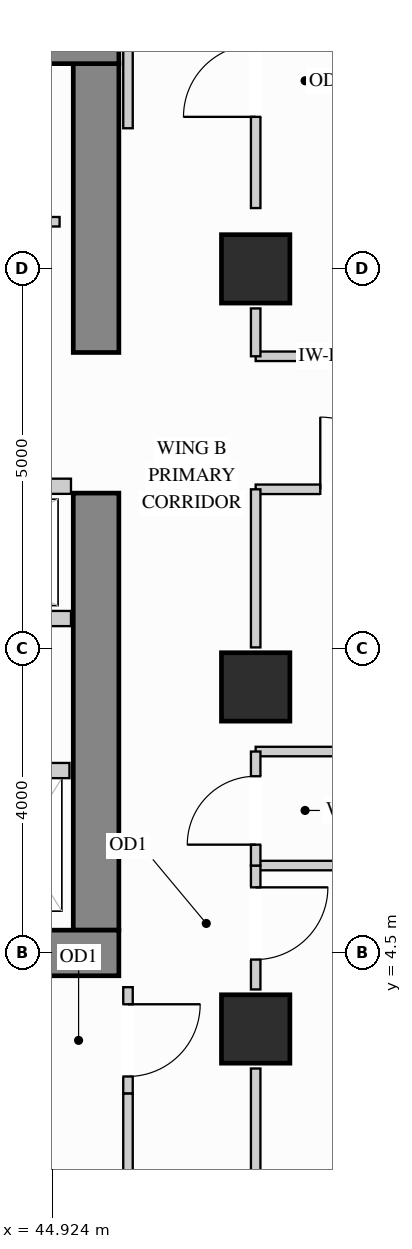
"""IFC4 building model, lengths in metres.
Left out: names, types, materials, properties, quantities, classifications, styles, units other than length and angle.
Written with IfcOpenShell. Run it as: python <this file> out.ifc"""

import sys

from ifc_helpers import new_model, si_unit, direction, frame, frame_2d, origin, origin_2d, place, context, subcontext, project, spatial, rectangle, extrude, source, transform, mapped, element, fill, save


model = new_model("IFC4")
c1 = context("Model", 3, precision=1e-05, world=origin(), true_north=direction((0.0, 1.0)))
c2 = subcontext(c1, "Body", "Model", "MODEL_VIEW")
j1 = project(units=[si_unit("LENGTHUNIT", "METRE"), si_unit("PLANEANGLEUNIT", "RADIAN")], contexts=[c1])
p1 = place(None, origin())
s1 = spatial("IfcSite", under=j1, at=p1, CompositionType="ELEMENT")
p2 = place(p1, origin())
s2 = spatial("IfcBuilding", under=s1, at=p2, CompositionType="ELEMENT")
p3 = place(p2, frame((0.0, 0.0, 171.9)))
s3 = spatial("IfcBuildingStorey", under=s2, at=p3, CompositionType="ELEMENT", Elevation=171.9)
m1 = source(origin(), c2, "Body", "SweptSolid", [
    extrude(rectangle(XDim=0.9, YDim=0.9, at=origin_2d()), origin(), (0.0, 0.0, 1.0), 3.4),
])
for number, where, z_axis, x_axis in (
    (1, (47.6, 13.5, 0.0), (0.0, 0.0, 1.0), (1.0, 0.0, 0.0)),
    (2, (47.6, 3.5, 0.0), (0.0, 0.0, 1.0), (1.0, 0.0, 0.0)),
    (3, (47.6, 8.0, 0.0), (0.0, 0.0, 1.0), (1.0, 0.0, 0.0)),
):
    element("IfcColumn", number, at=place(p3, frame(where, z_axis=z_axis, x_axis=x_axis)), inside=s3, PredefinedType="COLUMN", context=c2, shape_type="MappedRepresentation", body=[
        mapped(m1, transform((0.0, 0.0, 0.0), x_axis=(1.0, 0.0, 0.0), y_axis=(0.0, 1.0, 0.0), z_axis=(0.0, 0.0, 1.0))),
    ])
m2 = source(origin(), c2, "Body", "SweptSolid", [
    extrude(rectangle(XDim=5.75, YDim=0.6, at=frame_2d((2.875, 0.0))), origin(), (0.0, 0.0, 1.0), 3.4),
])
p4 = place(p3, frame((45.5, 4.8, 0.0), z_axis=(0.0, 0.0, 1.0), x_axis=(0.0, 1.0, 0.0)))
e4 = element("IfcWall", 4, at=p4, inside=s3, PredefinedType="SHEAR", context=c2, shape_type="MappedRepresentation", body=[
    mapped(m2, transform((0.0, 0.0, 0.0), x_axis=(1.0, 0.0, 0.0), y_axis=(0.0, 1.0, 0.0), z_axis=(0.0, 0.0, 1.0))),
])
m3 = source(origin(), c2, "Body", "SweptSolid", [
    extrude(rectangle(XDim=3.8, YDim=0.6, at=frame_2d((1.9, 0.0))), origin(), (0.0, 0.0, 1.0), 3.4),
])
p5 = place(p3, frame((45.5, 12.4, 0.0), z_axis=(0.0, 0.0, 1.0), x_axis=(0.0, 1.0, 0.0)))
e5 = element("IfcWall", 5, at=p5, inside=s3, PredefinedType="SHEAR", context=c2, shape_type="MappedRepresentation", body=[
    mapped(m3, transform((0.0, 0.0, 0.0), x_axis=(1.0, 0.0, 0.0), y_axis=(0.0, 1.0, 0.0), z_axis=(0.0, 0.0, 1.0))),
])
m4 = source(origin(), c2, "Body", "SweptSolid", [
    extrude(rectangle(XDim=10.1, YDim=0.6, at=frame_2d((5.05, 0.0))), origin(), (0.0, 0.0, 1.0), 3.4),
])
for number, where, z_axis, x_axis in (
    (6, (35.7, 16.5, 0.0), (0.0, 0.0, 1.0), (1.0, 0.0, 0.0)),
    (7, (35.7, 4.5, 0.0), (0.0, 0.0, 1.0), (1.0, 0.0, 0.0)),
):
    element("IfcWall", number, at=place(p3, frame(where, z_axis=z_axis, x_axis=x_axis)), inside=s3, PredefinedType="SHEAR", context=c2, shape_type="MappedRepresentation", body=[
        mapped(m4, transform((0.0, 0.0, 0.0), x_axis=(1.0, 0.0, 0.0), y_axis=(0.0, 1.0, 0.0), z_axis=(0.0, 0.0, 1.0))),
    ])
p6 = place(p3, frame((40.75, 14.12, 0.0), z_axis=(0.0, 0.0, 1.0), x_axis=(1.0, 0.0, 0.0)))
e8 = element("IfcWall", 8, at=p6, inside=s3, PredefinedType="PARTITIONING", context=c2, shape_type="SweptSolid", body=[
    extrude(rectangle(XDim=4.27, YDim=0.125, at=frame_2d((2.135, 0.0))), origin(), (0.0, 0.0, 1.0), 3.385),
])
p7 = place(p6, frame((1.66, 0.0, 0.0)))
e9 = element("IfcOpeningElement", 9, at=p7, cuts=e8, PredefinedType="OPENING", context=c2, shape_type="SweptSolid", body=[
    extrude(rectangle(XDim=0.95, YDim=2.15, at=frame_2d((0.475, 1.075))), frame((0.0, 0.073, 0.0), z_axis=(0.0, -1.0, 0.0), x_axis=(1.0, 0.0, 0.0)), (0.0, 0.0, 1.0), 0.145),
])
m5 = source(origin(), c2, "Body", "SweptSolid", [
    extrude(rectangle(XDim=5.048, YDim=0.125, at=frame_2d((2.524, 0.0))), origin(), (0.0, 0.0, 1.0), 3.385),
])
for number, where, z_axis, x_axis in (
    (10, (47.6, 5.65, 0.0), (0.0, 0.0, 1.0), (1.0, 0.0, 0.0)),
    (11, (47.6, 7.15, 0.0), (0.0, 0.0, 1.0), (1.0, 0.0, 0.0)),
):
    element("IfcWall", number, at=place(p3, frame(where, z_axis=z_axis, x_axis=x_axis)), inside=s3, PredefinedType="PARTITIONING", context=c2, shape_type="MappedRepresentation", body=[
        mapped(m5, transform((0.0, 0.0, 0.0), x_axis=(1.0, 0.0, 0.0), y_axis=(0.0, 1.0, 0.0), z_axis=(0.0, 0.0, 1.0))),
    ])
m6 = source(origin(), c2, "Body", "SweptSolid", [
    extrude(rectangle(XDim=2.65, YDim=0.125, at=frame_2d((1.325, 0.0))), origin(), (0.0, 0.0, 1.0), 3.385),
])
p8 = place(p3, frame((47.6, 12.35, 0.0), z_axis=(0.0, 0.0, 1.0), x_axis=(1.0, 0.0, 0.0)))
e12 = element("IfcWall", 12, at=p8, inside=s3, PredefinedType="PARTITIONING", context=c2, shape_type="MappedRepresentation", body=[
    mapped(m6, transform((0.0, 0.0, 0.0), x_axis=(1.0, 0.0, 0.0), y_axis=(0.0, 1.0, 0.0), z_axis=(0.0, 0.0, 1.0))),
])
p9 = place(p3, frame((47.6, 10.6, 0.0), z_axis=(0.0, 0.0, 1.0), x_axis=(1.0, 0.0, 0.0)))
e13 = element("IfcWall", 13, at=p9, inside=s3, PredefinedType="PARTITIONING", context=c2, shape_type="SweptSolid", body=[
    extrude(rectangle(XDim=2.65, YDim=0.125, at=frame_2d((1.325, 0.0))), origin(), (0.0, 0.0, 1.0), 2.773),
])
p10 = place(p9, frame((0.85, 0.0, 0.0)))
e14 = element("IfcOpeningElement", 14, at=p10, cuts=e13, PredefinedType="OPENING", context=c2, shape_type="SweptSolid", body=[
    extrude(rectangle(XDim=0.95, YDim=2.15, at=frame_2d((0.475, 1.075))), frame((0.0, 0.073, 0.0), z_axis=(0.0, -1.0, 0.0), x_axis=(1.0, 0.0, 0.0)), (0.0, 0.0, 1.0), 0.145),
])
p11 = place(p3, frame((47.6, 4.02, 0.0), z_axis=(0.0, 0.0, 1.0), x_axis=(0.0, 1.0, 0.0)))
e15 = element("IfcWall", 15, at=p11, inside=s3, PredefinedType="PARTITIONING", context=c2, shape_type="SweptSolid", body=[
    extrude(rectangle(XDim=1.63, YDim=0.125, at=frame_2d((0.815, 0.0))), origin(), (0.0, 0.0, 1.0), 2.773),
])
p12 = place(p11, frame((0.393, 0.0, 0.0)))
e16 = element("IfcOpeningElement", 16, at=p12, cuts=e15, PredefinedType="OPENING", context=c2, shape_type="SweptSolid", body=[
    extrude(rectangle(XDim=0.95, YDim=2.15, at=frame_2d((0.475, 1.075))), frame((0.0, 0.073, 0.0), z_axis=(0.0, -1.0, 0.0), x_axis=(1.0, 0.0, 0.0)), (0.0, 0.0, 1.0), 0.145),
])
m7 = source(origin(), c2, "Body", "SweptSolid", [
    extrude(rectangle(XDim=1.86, YDim=0.125, at=frame_2d((0.93, 0.0))), origin(), (0.0, 0.0, 1.0), 2.773),
])
p13 = place(p3, frame((47.6, 1.12, 0.0), z_axis=(0.0, 0.0, 1.0), x_axis=(0.0, 1.0, 0.0)))
e17 = element("IfcWall", 17, at=p13, inside=s3, PredefinedType="PARTITIONING", context=c2, shape_type="MappedRepresentation", body=[
    mapped(m7, transform((0.0, 0.0, 0.0), x_axis=(1.0, 0.0, 0.0), y_axis=(0.0, 1.0, 0.0), z_axis=(0.0, 0.0, 1.0))),
])
m8 = source(origin(), c2, "Body", "SweptSolid", [
    extrude(rectangle(XDim=2.08, YDim=0.125, at=frame_2d((1.04, 0.0))), origin(), (0.0, 0.0, 1.0), 2.773),
])
p14 = place(p3, frame((47.6, 8.52, 0.0), z_axis=(0.0, 0.0, 1.0), x_axis=(0.0, 1.0, 0.0)))
e18 = element("IfcWall", 18, at=p14, inside=s3, PredefinedType="PARTITIONING", context=c2, shape_type="MappedRepresentation", body=[
    mapped(m8, transform((0.0, 0.0, 0.0), x_axis=(1.0, 0.0, 0.0), y_axis=(0.0, 1.0, 0.0), z_axis=(0.0, 0.0, 1.0))),
])
p15 = place(p3, frame((47.6, 14.3, 0.0), z_axis=(0.0, 0.0, 1.0), x_axis=(0.0, 1.0, 0.0)))
e19 = element("IfcWall", 19, at=p15, inside=s3, PredefinedType="PARTITIONING", context=c2, shape_type="SweptSolid", body=[
    extrude(rectangle(XDim=2.58, YDim=0.125, at=frame_2d((1.29, 0.0))), origin(), (0.0, 0.0, 1.0), 2.773),
])
p16 = place(p15, frame((1.2, 0.0, 0.0)))
e20 = element("IfcOpeningElement", 20, at=p16, cuts=e19, PredefinedType="OPENING", context=c2, shape_type="SweptSolid", body=[
    extrude(rectangle(XDim=0.95, YDim=2.15, at=frame_2d((0.475, 1.075))), frame((0.0, 0.073, 0.0), z_axis=(0.0, -1.0, 0.0), x_axis=(1.0, 0.0, 0.0)), (0.0, 0.0, 1.0), 0.145),
])
m9 = source(origin(), c2, "Body", "SweptSolid", [
    extrude(rectangle(XDim=0.63, YDim=0.125, at=frame_2d((0.315, 0.0))), origin(), (0.0, 0.0, 1.0), 2.773),
])
p17 = place(p3, frame((47.6, 12.35, 0.0), z_axis=(0.0, 0.0, 1.0), x_axis=(0.0, 1.0, 0.0)))
e21 = element("IfcWall", 21, at=p17, inside=s3, PredefinedType="PARTITIONING", context=c2, shape_type="MappedRepresentation", body=[
    mapped(m9, transform((0.0, 0.0, 0.0), x_axis=(1.0, 0.0, 0.0), y_axis=(0.0, 1.0, 0.0), z_axis=(0.0, 0.0, 1.0))),
])
p18 = place(p3, frame((47.6, 5.65, 0.0), z_axis=(0.0, 0.0, 1.0), x_axis=(0.0, 1.0, 0.0)))
e22 = element("IfcWall", 22, at=p18, inside=s3, PredefinedType="PARTITIONING", context=c2, shape_type="SweptSolid", body=[
    extrude(rectangle(XDim=1.5, YDim=0.125, at=frame_2d((0.75, 0.0))), origin(), (0.0, 0.0, 1.0), 2.773),
])
p19 = place(p18, frame((0.275, 0.0, 0.0)))
e23 = element("IfcOpeningElement", 23, at=p19, cuts=e22, PredefinedType="OPENING", context=c2, shape_type="SweptSolid", body=[
    extrude(rectangle(XDim=0.9, YDim=2.15, at=frame_2d((0.45, 1.075))), frame((0.0, 0.073, 0.0), z_axis=(0.0, -1.0, 0.0), x_axis=(1.0, 0.0, 0.0)), (0.0, 0.0, 1.0), 0.145),
])
m10 = source(origin(), c2, "Body", "SweptSolid", [
    extrude(rectangle(XDim=2.298, YDim=0.125, at=frame_2d((1.149, 0.0))), origin(), (0.0, 0.0, 1.0), 3.385),
])
p20 = place(p3, frame((45.92, 15.35, 0.0), z_axis=(0.0, 0.0, 1.0), x_axis=(0.0, 1.0, 0.0)))
e24 = element("IfcWall", 24, at=p20, inside=s3, PredefinedType="PARTITIONING", context=c2, shape_type="MappedRepresentation", body=[
    mapped(m10, transform((0.0, 0.0, 0.0), x_axis=(1.0, 0.0, 0.0), y_axis=(0.0, 1.0, 0.0), z_axis=(0.0, 0.0, 1.0))),
])
p21 = place(p3, frame((45.92, 2.65, 0.0), z_axis=(0.0, 0.0, 1.0), x_axis=(0.0, 1.0, 0.0)))
e25 = element("IfcWall", 25, at=p21, inside=s3, PredefinedType="PARTITIONING", context=c2, shape_type="SweptSolid", body=[
    extrude(rectangle(XDim=1.4, YDim=0.125, at=frame_2d((0.7, 0.0))), origin(), (0.0, 0.0, 1.0), 3.385),
])
p22 = place(p21, frame((0.225, 0.0, 0.0)))
e26 = element("IfcOpeningElement", 26, at=p22, cuts=e25, PredefinedType="OPENING", context=c2, shape_type="SweptSolid", body=[
    extrude(rectangle(XDim=0.95, YDim=2.15, at=frame_2d((0.475, 1.075))), frame((0.0, 0.073, 0.0), z_axis=(0.0, -1.0, 0.0), x_axis=(1.0, 0.0, 0.0)), (0.0, 0.0, 1.0), 0.145),
])
p23 = place(p3, frame((45.92, 0.352, 0.0), z_axis=(0.0, 0.0, 1.0), x_axis=(0.0, 1.0, 0.0)))
e27 = element("IfcWall", 27, at=p23, inside=s3, PredefinedType="PARTITIONING", context=c2, shape_type="MappedRepresentation", body=[
    mapped(m10, transform((0.0, 0.0, 0.0), x_axis=(1.0, 0.0, 0.0), y_axis=(0.0, 1.0, 0.0), z_axis=(0.0, 0.0, 1.0))),
])
m11 = source(origin(), c2, "Body", "SweptSolid", [
    extrude(rectangle(XDim=1.3, YDim=0.2, at=frame_2d((0.65, 0.0))), origin(), (0.0, 0.0, 1.0), 3.385),
])
p24 = place(p3, frame((43.85, 6.9, 0.0), z_axis=(0.0, 0.0, 1.0), x_axis=(1.0, 0.0, 0.0)))
e28 = element("IfcWall", 28, at=p24, inside=s3, PredefinedType="PARTITIONING", context=c2, shape_type="MappedRepresentation", body=[
    mapped(m11, transform((0.0, 0.0, 0.0), x_axis=(1.0, 0.0, 0.0), y_axis=(0.0, 1.0, 0.0), z_axis=(0.0, 0.0, 1.0))),
])
m12 = source(origin(), c2, "Body", "SweptSolid", [
    extrude(rectangle(XDim=3.49, YDim=0.2, at=frame_2d((1.745, 0.0))), origin(), (0.0, 0.0, 1.0), 3.385),
])
for number, where, z_axis, x_axis in (
    (29, (41.68, 10.64, 0.0), (0.0, 0.0, 1.0), (1.0, 0.0, 0.0)),
    (30, (41.68, 8.9, 0.0), (0.0, 0.0, 1.0), (1.0, 0.0, 0.0)),
):
    element("IfcWall", number, at=place(p3, frame(where, z_axis=z_axis, x_axis=x_axis)), inside=s3, PredefinedType="PARTITIONING", context=c2, shape_type="MappedRepresentation", body=[
        mapped(m12, transform((0.0, 0.0, 0.0), x_axis=(1.0, 0.0, 0.0), y_axis=(0.0, 1.0, 0.0), z_axis=(0.0, 0.0, 1.0))),
    ])
m13 = source(origin(), c2, "Body", "SweptSolid", [
    extrude(rectangle(XDim=0.95, YDim=2.15, at=frame_2d((0.475, 1.075))), frame((0.0, 0.025, 0.0), z_axis=(0.0, -1.0, 0.0), x_axis=(1.0, 0.0, 0.0)), (0.0, 0.0, 1.0), 0.05),
])
p25 = place(p22, origin())
e31 = element("IfcDoor", 31, at=p25, inside=s3, OperationType="SINGLE_SWING_RIGHT", PredefinedType="DOOR", context=c2, shape_type="MappedRepresentation", body=[
    mapped(m13, transform((0.0, 0.0, 0.0), x_axis=(1.0, 0.0, 0.0), y_axis=(0.0, 1.0, 0.0), z_axis=(0.0, 0.0, 1.0))),
])
fill(e26, e31)
p26 = place(p12, origin())
e32 = element("IfcDoor", 32, at=p26, inside=s3, OperationType="SINGLE_SWING_RIGHT", PredefinedType="DOOR", context=c2, shape_type="MappedRepresentation", body=[
    mapped(m13, transform((0.0, 0.0, 0.0), x_axis=(1.0, 0.0, 0.0), y_axis=(0.0, 1.0, 0.0), z_axis=(0.0, 0.0, 1.0))),
])
fill(e16, e32)
p27 = place(p10, origin())
e33 = element("IfcDoor", 33, at=p27, inside=s3, OperationType="SINGLE_SWING_LEFT", PredefinedType="DOOR", context=c2, shape_type="MappedRepresentation", body=[
    mapped(m13, transform((0.0, 0.0, 0.0), x_axis=(1.0, 0.0, 0.0), y_axis=(0.0, 1.0, 0.0), z_axis=(0.0, 0.0, 1.0))),
])
fill(e14, e33)
p28 = place(p16, origin())
e34 = element("IfcDoor", 34, at=p28, inside=s3, OperationType="SINGLE_SWING_LEFT", PredefinedType="DOOR", context=c2, shape_type="MappedRepresentation", body=[
    mapped(m13, transform((0.0, 0.0, 0.0), x_axis=(1.0, 0.0, 0.0), y_axis=(0.0, 1.0, 0.0), z_axis=(0.0, 0.0, 1.0))),
])
fill(e20, e34)
m14 = source(origin(), c2, "Body", "SweptSolid", [
    extrude(rectangle(XDim=0.9, YDim=2.15, at=frame_2d((0.45, 1.075))), frame((0.0, 0.025, 0.0), z_axis=(0.0, -1.0, 0.0), x_axis=(1.0, 0.0, 0.0)), (0.0, 0.0, 1.0), 0.05),
])
p29 = place(p19, origin())
e35 = element("IfcDoor", 35, at=p29, inside=s3, OperationType="SINGLE_SWING_LEFT", PredefinedType="DOOR", context=c2, shape_type="MappedRepresentation", body=[
    mapped(m14, transform((0.0, 0.0, 0.0), x_axis=(1.0, 0.0, 0.0), y_axis=(0.0, 1.0, 0.0), z_axis=(0.0, 0.0, 1.0))),
])
fill(e23, e35)
save(model, sys.argv[1])
